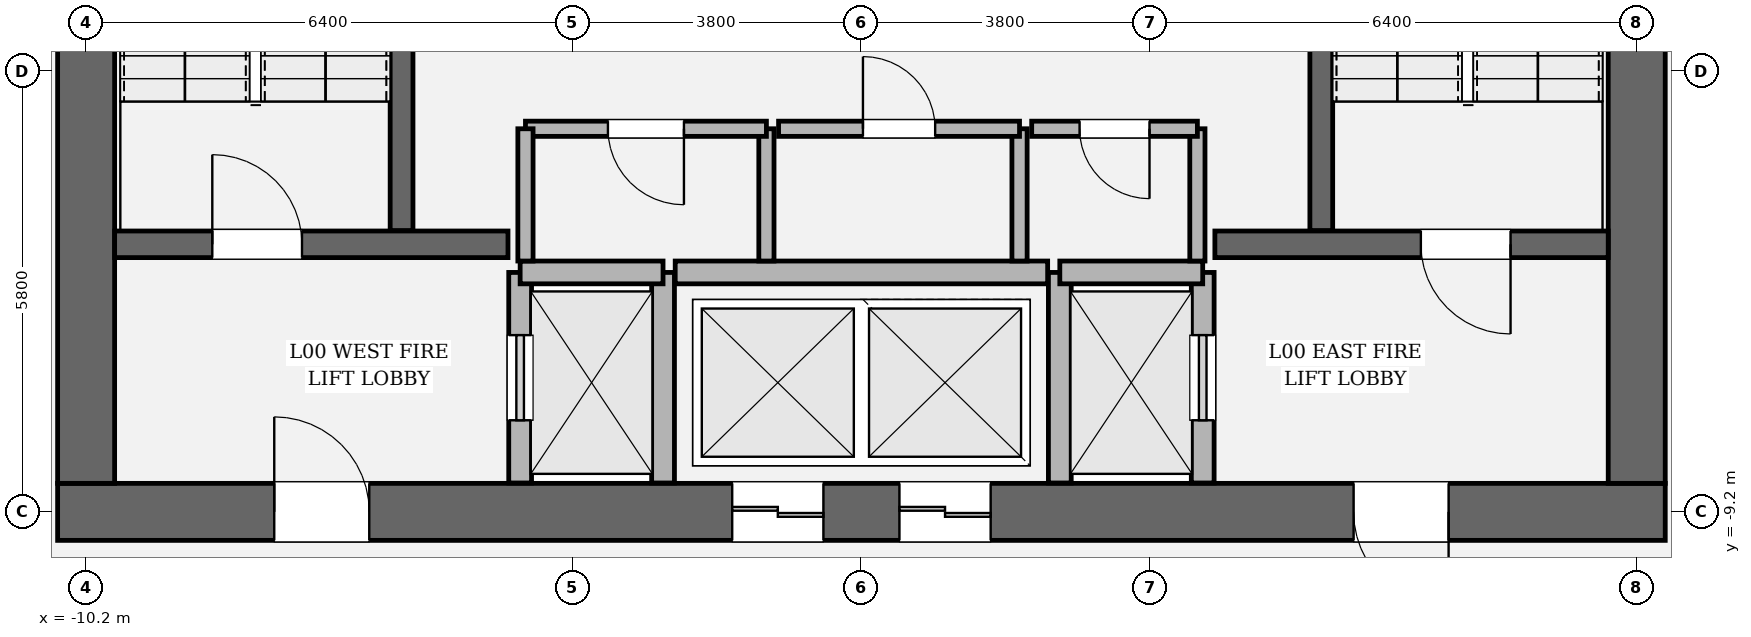
"""IFC4 building model, lengths in metres.
Left out: names, types, materials, properties, quantities, classifications, styles, units other than length and angle.
Written with IfcOpenShell. Run it as: python <this file> out.ifc"""

import sys

from ifc_helpers import new_model, si_unit, direction, frame, frame_2d, origin, place, context, subcontext, project, spatial, rectangle, extrude, element, fill, save


model = new_model("IFC4")
c1 = context("Model", 3, precision=1e-05, world=origin(), true_north=direction((0.0, 1.0)))
c2 = subcontext(c1, "Body", "Model", "MODEL_VIEW")
j1 = project(units=[si_unit("LENGTHUNIT", "METRE"), si_unit("PLANEANGLEUNIT", "RADIAN")], contexts=[c1])
p1 = place(None, origin())
s1 = spatial("IfcSite", under=j1, at=p1, CompositionType="ELEMENT")
p2 = place(p1, origin())
s2 = spatial("IfcBuilding", under=s1, at=p2, CompositionType="ELEMENT")
p3 = place(p2, origin())
s3 = spatial("IfcBuildingStorey", under=s2, at=p3, CompositionType="ELEMENT", Elevation=0.0)
p4 = place(p3, frame((10.575, -9.2, 0.0), z_axis=(0.0, 0.0, 1.0), x_axis=(-1.0, 0.0, 0.0)))
e1 = element("IfcWall", 1, at=p4, inside=s3, PredefinedType="SHEAR", context=c2, shape_type="SweptSolid", body=[
    extrude(rectangle(XDim=21.15, YDim=0.75, at=frame_2d((10.575, 0.0))), origin(), (0.0, 0.0, 1.0), 6.0),
])
p5 = place(p4, frame((2.85, 0.0, 0.0)))
e2 = element("IfcOpeningElement", 2, at=p5, cuts=e1, PredefinedType="OPENING", context=c2, shape_type="SweptSolid", body=[
    extrude(rectangle(XDim=1.25, YDim=2.25, at=frame_2d((0.625, 1.125))), frame((0.0, 0.385, 0.0), z_axis=(0.0, -1.0, 0.0), x_axis=(1.0, 0.0, 0.0)), (0.0, 0.0, 1.0), 0.77),
])
p6 = place(p4, frame((17.05, 0.0, 0.0)))
e3 = element("IfcOpeningElement", 3, at=p6, cuts=e1, PredefinedType="OPENING", context=c2, shape_type="SweptSolid", body=[
    extrude(rectangle(XDim=1.25, YDim=2.25, at=frame_2d((0.625, 1.125))), frame((0.0, 0.385, 0.0), z_axis=(0.0, -1.0, 0.0), x_axis=(1.0, 0.0, 0.0)), (0.0, 0.0, 1.0), 0.77),
])
p7 = place(p4, frame((11.075, 0.0, 0.0)))
e4 = element("IfcOpeningElement", 4, at=p7, cuts=e1, PredefinedType="OPENING", context=c2, shape_type="SweptSolid", body=[
    extrude(rectangle(XDim=1.2, YDim=2.3, at=frame_2d((0.6, 1.15))), frame((0.0, 0.385, 0.0), z_axis=(0.0, -1.0, 0.0), x_axis=(1.0, 0.0, 0.0)), (0.0, 0.0, 1.0), 0.77),
])
p8 = place(p4, frame((8.875, 0.0, 0.0)))
e5 = element("IfcOpeningElement", 5, at=p8, cuts=e1, PredefinedType="OPENING", context=c2, shape_type="SweptSolid", body=[
    extrude(rectangle(XDim=1.2, YDim=2.3, at=frame_2d((0.6, 1.15))), frame((0.0, 0.385, 0.0), z_axis=(0.0, -1.0, 0.0), x_axis=(1.0, 0.0, 0.0)), (0.0, 0.0, 1.0), 0.77),
])
p9 = place(p3, frame((-10.2, -8.825, 0.0), z_axis=(0.0, 0.0, 1.0), x_axis=(0.0, 1.0, 0.0)))
e6 = element("IfcWall", 6, at=p9, inside=s3, PredefinedType="SHEAR", context=c2, shape_type="SweptSolid", body=[
    extrude(rectangle(XDim=17.65, YDim=0.75, at=frame_2d((8.825, 0.0))), origin(), (0.0, 0.0, 1.0), 6.0),
])
p10 = place(p9, frame((12.615, 0.0, 0.0)))
e7 = element("IfcOpeningElement", 7, at=p10, cuts=e6, PredefinedType="OPENING", context=c2, shape_type="SweptSolid", body=[
    extrude(rectangle(XDim=1.18, YDim=2.2, at=frame_2d((0.59, 1.1))), frame((0.0, 0.385, 0.0), z_axis=(0.0, -1.0, 0.0), x_axis=(1.0, 0.0, 0.0)), (0.0, 0.0, 1.0), 0.77),
])
p11 = place(p9, frame((14.865, 0.0, 0.0)))
e8 = element("IfcOpeningElement", 8, at=p11, cuts=e6, PredefinedType="OPENING", context=c2, shape_type="SweptSolid", body=[
    extrude(rectangle(XDim=1.12, YDim=2.25, at=frame_2d((0.56, 1.125))), frame((0.0, 0.385, 0.0), z_axis=(0.0, -1.0, 0.0), x_axis=(1.0, 0.0, 0.0)), (0.0, 0.0, 1.0), 0.77),
])
p12 = place(p9, frame((16.245, 0.0, 0.0)))
e9 = element("IfcOpeningElement", 9, at=p12, cuts=e6, PredefinedType="OPENING", context=c2, shape_type="SweptSolid", body=[
    extrude(rectangle(XDim=1.12, YDim=2.25, at=frame_2d((0.56, 1.125))), frame((0.0, 0.385, 0.0), z_axis=(0.0, -1.0, 0.0), x_axis=(1.0, 0.0, 0.0)), (0.0, 0.0, 1.0), 0.77),
])
p13 = place(p3, frame((10.2, 8.825, 0.0), z_axis=(0.0, 0.0, 1.0), x_axis=(0.0, -1.0, 0.0)))
e10 = element("IfcWall", 10, at=p13, inside=s3, PredefinedType="SHEAR", context=c2, shape_type="SweptSolid", body=[
    extrude(rectangle(XDim=17.65, YDim=0.75, at=frame_2d((8.825, 0.0))), origin(), (0.0, 0.0, 1.0), 6.0),
])
p14 = place(p13, frame((3.855, 0.0, 0.0)))
e11 = element("IfcOpeningElement", 11, at=p14, cuts=e10, PredefinedType="OPENING", context=c2, shape_type="SweptSolid", body=[
    extrude(rectangle(XDim=1.18, YDim=2.2, at=frame_2d((0.59, 1.1))), frame((0.0, 0.385, 0.0), z_axis=(0.0, -1.0, 0.0), x_axis=(1.0, 0.0, 0.0)), (0.0, 0.0, 1.0), 0.77),
])
p15 = place(p13, frame((1.665, 0.0, 0.0)))
e12 = element("IfcOpeningElement", 12, at=p15, cuts=e10, PredefinedType="OPENING", context=c2, shape_type="SweptSolid", body=[
    extrude(rectangle(XDim=1.12, YDim=2.25, at=frame_2d((0.56, 1.125))), frame((0.0, 0.385, 0.0), z_axis=(0.0, -1.0, 0.0), x_axis=(1.0, 0.0, 0.0)), (0.0, 0.0, 1.0), 0.77),
])
p16 = place(p13, frame((0.285, 0.0, 0.0)))
e13 = element("IfcOpeningElement", 13, at=p16, cuts=e10, PredefinedType="OPENING", context=c2, shape_type="SweptSolid", body=[
    extrude(rectangle(XDim=1.12, YDim=2.25, at=frame_2d((0.56, 1.125))), frame((0.0, 0.385, 0.0), z_axis=(0.0, -1.0, 0.0), x_axis=(1.0, 0.0, 0.0)), (0.0, 0.0, 1.0), 0.77),
])
for number, where, z_axis, x_axis in (
    (14, (-6.05, -5.5, 0.0), (0.0, 0.0, 1.0), (0.0, 1.0, 0.0)),
    (15, (6.05, 3.45, 0.0), (0.0, 0.0, 1.0), (0.0, -1.0, 0.0)),
):
    element("IfcWall", number, at=place(p3, frame(where, z_axis=z_axis, x_axis=x_axis)), inside=s3, PredefinedType="SOLIDWALL", context=c2, shape_type="SweptSolid", body=[
        extrude(rectangle(XDim=8.95, YDim=0.3, at=frame_2d((4.475, 0.0))), origin(), (0.0, 0.0, 1.0), 6.0),
    ])
p17 = place(p3, frame((-9.825, -5.68, 0.0), z_axis=(0.0, 0.0, 1.0), x_axis=(1.0, 0.0, 0.0)))
e16 = element("IfcWall", 16, at=p17, inside=s3, PredefinedType="SOLIDWALL", context=c2, shape_type="SweptSolid", body=[
    extrude(rectangle(XDim=5.175, YDim=0.35, at=frame_2d((2.587, 0.0))), origin(), (0.0, 0.0, 1.0), 6.0),
])
p18 = place(p17, frame((1.285, 0.0, 0.0)))
e17 = element("IfcOpeningElement", 17, at=p18, cuts=e16, PredefinedType="OPENING", context=c2, shape_type="SweptSolid", body=[
    extrude(rectangle(XDim=1.18, YDim=2.2, at=frame_2d((0.59, 1.1))), frame((0.0, 0.185, 0.0), z_axis=(0.0, -1.0, 0.0), x_axis=(1.0, 0.0, 0.0)), (0.0, 0.0, 1.0), 0.37),
])
p19 = place(p3, frame((4.65, -5.68, 0.0), z_axis=(0.0, 0.0, 1.0), x_axis=(1.0, 0.0, 0.0)))
e18 = element("IfcWall", 18, at=p19, inside=s3, PredefinedType="SOLIDWALL", context=c2, shape_type="SweptSolid", body=[
    extrude(rectangle(XDim=5.175, YDim=0.35, at=frame_2d((2.587, 0.0))), origin(), (0.0, 0.0, 1.0), 6.0),
])
p20 = place(p19, frame((2.71, 0.0, 0.0)))
e19 = element("IfcOpeningElement", 19, at=p20, cuts=e18, PredefinedType="OPENING", context=c2, shape_type="SweptSolid", body=[
    extrude(rectangle(XDim=1.18, YDim=2.2, at=frame_2d((0.59, 1.1))), frame((0.0, 0.185, 0.0), z_axis=(0.0, -1.0, 0.0), x_axis=(1.0, 0.0, 0.0)), (0.0, 0.0, 1.0), 0.37),
])
p21 = place(p3, frame((-4.49, -8.82, 0.0), z_axis=(0.0, 0.0, 1.0), x_axis=(0.0, 1.0, 0.0)))
e20 = element("IfcWall", 20, at=p21, inside=s3, PredefinedType="SOLIDWALL", context=c2, shape_type="SweptSolid", body=[
    extrude(rectangle(XDim=2.77, YDim=0.3, at=frame_2d((1.385, 0.0))), origin(), (0.0, 0.0, 1.0), 5.72),
])
p22 = place(p21, frame((0.825, 0.0, 0.0)))
e21 = element("IfcOpeningElement", 21, at=p22, cuts=e20, PredefinedType="OPENING", context=c2, shape_type="SweptSolid", body=[
    extrude(rectangle(XDim=1.12, YDim=2.25, at=frame_2d((0.56, 1.125))), frame((0.0, 0.16, 0.0), z_axis=(0.0, -1.0, 0.0), x_axis=(1.0, 0.0, 0.0)), (0.0, 0.0, 1.0), 0.32),
])
p23 = place(p3, frame((-2.61, -8.82, 0.0), z_axis=(0.0, 0.0, 1.0), x_axis=(0.0, 1.0, 0.0)))
e22 = element("IfcWall", 22, at=p23, inside=s3, PredefinedType="SOLIDWALL", context=c2, shape_type="SweptSolid", body=[
    extrude(rectangle(XDim=2.77, YDim=0.3, at=frame_2d((1.385, 0.0))), origin(), (0.0, 0.0, 1.0), 5.72),
])
p24 = place(p3, frame((-4.49, -6.05, 0.0), z_axis=(0.0, 0.0, 1.0), x_axis=(1.0, 0.0, 0.0)))
e23 = element("IfcWall", 23, at=p24, inside=s3, PredefinedType="SOLIDWALL", context=c2, shape_type="SweptSolid", body=[
    extrude(rectangle(XDim=1.88, YDim=0.3, at=frame_2d((0.94, 0.0))), origin(), (0.0, 0.0, 1.0), 5.72),
])
p25 = place(p3, frame((4.49, -8.82, 0.0), z_axis=(0.0, 0.0, 1.0), x_axis=(0.0, 1.0, 0.0)))
e24 = element("IfcWall", 24, at=p25, inside=s3, PredefinedType="SOLIDWALL", context=c2, shape_type="SweptSolid", body=[
    extrude(rectangle(XDim=2.77, YDim=0.3, at=frame_2d((1.385, 0.0))), origin(), (0.0, 0.0, 1.0), 5.72),
])
p26 = place(p25, frame((0.825, 0.0, 0.0)))
e25 = element("IfcOpeningElement", 25, at=p26, cuts=e24, PredefinedType="OPENING", context=c2, shape_type="SweptSolid", body=[
    extrude(rectangle(XDim=1.12, YDim=2.25, at=frame_2d((0.56, 1.125))), frame((0.0, 0.16, 0.0), z_axis=(0.0, -1.0, 0.0), x_axis=(1.0, 0.0, 0.0)), (0.0, 0.0, 1.0), 0.32),
])
p27 = place(p3, frame((2.61, -8.82, 0.0), z_axis=(0.0, 0.0, 1.0), x_axis=(0.0, 1.0, 0.0)))
e26 = element("IfcWall", 26, at=p27, inside=s3, PredefinedType="SOLIDWALL", context=c2, shape_type="SweptSolid", body=[
    extrude(rectangle(XDim=2.77, YDim=0.3, at=frame_2d((1.385, 0.0))), origin(), (0.0, 0.0, 1.0), 5.72),
])
p28 = place(p3, frame((2.61, -6.05, 0.0), z_axis=(0.0, 0.0, 1.0), x_axis=(1.0, 0.0, 0.0)))
e27 = element("IfcWall", 27, at=p28, inside=s3, PredefinedType="SOLIDWALL", context=c2, shape_type="SweptSolid", body=[
    extrude(rectangle(XDim=1.88, YDim=0.3, at=frame_2d((0.94, 0.0))), origin(), (0.0, 0.0, 1.0), 5.72),
])
p29 = place(p3, frame((-2.45, -6.05, 0.0), z_axis=(0.0, 0.0, 1.0), x_axis=(1.0, 0.0, 0.0)))
e28 = element("IfcWall", 28, at=p29, inside=s3, PredefinedType="SOLIDWALL", context=c2, shape_type="SweptSolid", body=[
    extrude(rectangle(XDim=4.9, YDim=0.3, at=frame_2d((2.45, 0.0))), origin(), (0.0, 0.0, 1.0), 5.72),
])
p30 = place(p3, frame((-1.25, -5.9, 0.0), z_axis=(0.0, 0.0, 1.0), x_axis=(0.0, 1.0, 0.0)))
e29 = element("IfcWall", 29, at=p30, inside=s3, PredefinedType="SOLIDWALL", context=c2, shape_type="SweptSolid", body=[
    extrude(rectangle(XDim=1.74, YDim=0.2, at=frame_2d((0.87, 0.0))), origin(), (0.0, 0.0, 1.0), 5.72),
])
p31 = place(p3, frame((-1.25, -4.16, 0.0), z_axis=(0.0, 0.0, 1.0), x_axis=(-1.0, 0.0, 0.0)))
e30 = element("IfcWall", 30, at=p31, inside=s3, PredefinedType="SOLIDWALL", context=c2, shape_type="SweptSolid", body=[
    extrude(rectangle(XDim=3.17, YDim=0.2, at=frame_2d((1.585, 0.0))), origin(), (0.0, 0.0, 1.0), 5.72),
])
p32 = place(p31, frame((1.085, 0.0, 0.0)))
e31 = element("IfcOpeningElement", 31, at=p32, cuts=e30, PredefinedType="OPENING", context=c2, shape_type="SweptSolid", body=[
    extrude(rectangle(XDim=1.0, YDim=2.15, at=frame_2d((0.5, 1.075))), frame((0.0, 0.11, 0.0), z_axis=(0.0, -1.0, 0.0), x_axis=(1.0, 0.0, 0.0)), (0.0, 0.0, 1.0), 0.22),
])
for number, where, z_axis, x_axis in (
    (32, (-4.42, -4.16, 0.0), (0.0, 0.0, 1.0), (0.0, -1.0, 0.0)),
    (33, (2.08, -5.9, 0.0), (0.0, 0.0, 1.0), (0.0, 1.0, 0.0)),
):
    element("IfcWall", number, at=place(p3, frame(where, z_axis=z_axis, x_axis=x_axis)), inside=s3, PredefinedType="SOLIDWALL", context=c2, shape_type="SweptSolid", body=[
        extrude(rectangle(XDim=1.74, YDim=0.2, at=frame_2d((0.87, 0.0))), origin(), (0.0, 0.0, 1.0), 5.72),
    ])
p33 = place(p3, frame((2.08, -4.16, 0.0), z_axis=(0.0, 0.0, 1.0), x_axis=(-1.0, 0.0, 0.0)))
e34 = element("IfcWall", 34, at=p33, inside=s3, PredefinedType="SOLIDWALL", context=c2, shape_type="SweptSolid", body=[
    extrude(rectangle(XDim=3.17, YDim=0.2, at=frame_2d((1.585, 0.0))), origin(), (0.0, 0.0, 1.0), 5.72),
])
p34 = place(p33, frame((1.11, 0.0, 0.0)))
e35 = element("IfcOpeningElement", 35, at=p34, cuts=e34, PredefinedType="OPENING", context=c2, shape_type="SweptSolid", body=[
    extrude(rectangle(XDim=0.95, YDim=2.15, at=frame_2d((0.475, 1.075))), frame((0.0, 0.11, 0.0), z_axis=(0.0, -1.0, 0.0), x_axis=(1.0, 0.0, 0.0)), (0.0, 0.0, 1.0), 0.22),
])
p35 = place(p3, frame((4.42, -5.9, 0.0), z_axis=(0.0, 0.0, 1.0), x_axis=(0.0, 1.0, 0.0)))
e36 = element("IfcWall", 36, at=p35, inside=s3, PredefinedType="SOLIDWALL", context=c2, shape_type="SweptSolid", body=[
    extrude(rectangle(XDim=1.74, YDim=0.2, at=frame_2d((0.87, 0.0))), origin(), (0.0, 0.0, 1.0), 5.72),
])
p36 = place(p3, frame((4.42, -4.16, 0.0), z_axis=(0.0, 0.0, 1.0), x_axis=(-1.0, 0.0, 0.0)))
e37 = element("IfcWall", 37, at=p36, inside=s3, PredefinedType="SOLIDWALL", context=c2, shape_type="SweptSolid", body=[
    extrude(rectangle(XDim=2.18, YDim=0.2, at=frame_2d((1.09, 0.0))), origin(), (0.0, 0.0, 1.0), 5.72),
])
p37 = place(p36, frame((0.63, 0.0, 0.0)))
e38 = element("IfcOpeningElement", 38, at=p37, cuts=e37, PredefinedType="OPENING", context=c2, shape_type="SweptSolid", body=[
    extrude(rectangle(XDim=0.92, YDim=2.1, at=frame_2d((0.46, 1.05))), frame((0.0, 0.11, 0.0), z_axis=(0.0, -1.0, 0.0), x_axis=(1.0, 0.0, 0.0)), (0.0, 0.0, 1.0), 0.22),
])
p38 = place(p18, origin())
e39 = element("IfcDoor", 39, at=p38, inside=s3, OperationType="SINGLE_SWING_LEFT", PredefinedType="DOOR", context=c2, shape_type="SweptSolid", body=[
    extrude(rectangle(XDim=1.18, YDim=2.2, at=frame_2d((0.59, 1.1))), frame((0.0, 0.025, 0.0), z_axis=(0.0, -1.0, 0.0), x_axis=(1.0, 0.0, 0.0)), (0.0, 0.0, 1.0), 0.05),
])
fill(e17, e39)
p39 = place(p20, origin())
e40 = element("IfcDoor", 40, at=p39, inside=s3, OperationType="SINGLE_SWING_RIGHT", PredefinedType="DOOR", context=c2, shape_type="SweptSolid", body=[
    extrude(rectangle(XDim=1.18, YDim=2.2, at=frame_2d((0.59, 1.1))), frame((0.0, 0.025, 0.0), z_axis=(0.0, -1.0, 0.0), x_axis=(1.0, 0.0, 0.0)), (0.0, 0.0, 1.0), 0.05),
])
fill(e19, e40)
p40 = place(p5, origin())
e41 = element("IfcDoor", 41, at=p40, inside=s3, OperationType="SINGLE_SWING_LEFT", PredefinedType="DOOR", context=c2, shape_type="SweptSolid", body=[
    extrude(rectangle(XDim=1.25, YDim=2.25, at=frame_2d((0.625, 1.125))), frame((0.0, 0.025, 0.0), z_axis=(0.0, -1.0, 0.0), x_axis=(1.0, 0.0, 0.0)), (0.0, 0.0, 1.0), 0.05),
])
fill(e2, e41)
p41 = place(p6, origin())
e42 = element("IfcDoor", 42, at=p41, inside=s3, OperationType="SINGLE_SWING_RIGHT", PredefinedType="DOOR", context=c2, shape_type="SweptSolid", body=[
    extrude(rectangle(XDim=1.25, YDim=2.25, at=frame_2d((0.625, 1.125))), frame((0.0, 0.025, 0.0), z_axis=(0.0, -1.0, 0.0), x_axis=(1.0, 0.0, 0.0)), (0.0, 0.0, 1.0), 0.05),
])
fill(e3, e42)
p42 = place(p22, origin())
e43 = element("IfcDoor", 43, at=p42, inside=s3, OperationType="SLIDING_TO_LEFT", PredefinedType="DOOR", context=c2, shape_type="SweptSolid", body=[
    extrude(rectangle(XDim=1.12, YDim=2.25, at=frame_2d((0.56, 1.125))), frame((0.0, 0.025, 0.0), z_axis=(0.0, -1.0, 0.0), x_axis=(1.0, 0.0, 0.0)), (0.0, 0.0, 1.0), 0.05),
])
fill(e21, e43)
p43 = place(p26, origin())
e44 = element("IfcDoor", 44, at=p43, inside=s3, OperationType="SLIDING_TO_RIGHT", PredefinedType="DOOR", context=c2, shape_type="SweptSolid", body=[
    extrude(rectangle(XDim=1.12, YDim=2.25, at=frame_2d((0.56, 1.125))), frame((0.0, 0.025, 0.0), z_axis=(0.0, -1.0, 0.0), x_axis=(1.0, 0.0, 0.0)), (0.0, 0.0, 1.0), 0.05),
])
fill(e25, e44)
p44 = place(p7, origin())
e45 = element("IfcDoor", 45, at=p44, inside=s3, OperationType="DOUBLE_DOOR_SLIDING", PredefinedType="DOOR", context=c2, shape_type="SweptSolid", body=[
    extrude(rectangle(XDim=1.2, YDim=2.3, at=frame_2d((0.6, 1.15))), frame((0.0, 0.025, 0.0), z_axis=(0.0, -1.0, 0.0), x_axis=(1.0, 0.0, 0.0)), (0.0, 0.0, 1.0), 0.05),
])
fill(e4, e45)
p45 = place(p8, origin())
e46 = element("IfcDoor", 46, at=p45, inside=s3, OperationType="DOUBLE_DOOR_SLIDING", PredefinedType="DOOR", context=c2, shape_type="SweptSolid", body=[
    extrude(rectangle(XDim=1.2, YDim=2.3, at=frame_2d((0.6, 1.15))), frame((0.0, 0.025, 0.0), z_axis=(0.0, -1.0, 0.0), x_axis=(1.0, 0.0, 0.0)), (0.0, 0.0, 1.0), 0.05),
])
fill(e5, e46)
p46 = place(p32, origin())
e47 = element("IfcDoor", 47, at=p46, inside=s3, OperationType="SINGLE_SWING_LEFT", PredefinedType="DOOR", context=c2, shape_type="SweptSolid", body=[
    extrude(rectangle(XDim=1.0, YDim=2.15, at=frame_2d((0.5, 1.075))), frame((0.0, 0.025, 0.0), z_axis=(0.0, -1.0, 0.0), x_axis=(1.0, 0.0, 0.0)), (0.0, 0.0, 1.0), 0.05),
])
fill(e31, e47)
p47 = place(p34, origin())
e48 = element("IfcDoor", 48, at=p47, inside=s3, OperationType="SINGLE_SWING_RIGHT", PredefinedType="DOOR", context=c2, shape_type="SweptSolid", body=[
    extrude(rectangle(XDim=0.95, YDim=2.15, at=frame_2d((0.475, 1.075))), frame((0.0, 0.025, 0.0), z_axis=(0.0, -1.0, 0.0), x_axis=(1.0, 0.0, 0.0)), (0.0, 0.0, 1.0), 0.05),
])
fill(e35, e48)
p48 = place(p37, origin())
e49 = element("IfcDoor", 49, at=p48, inside=s3, OperationType="SINGLE_SWING_LEFT", PredefinedType="DOOR", context=c2, shape_type="SweptSolid", body=[
    extrude(rectangle(XDim=0.92, YDim=2.1, at=frame_2d((0.46, 1.05))), frame((0.0, 0.025, 0.0), z_axis=(0.0, -1.0, 0.0), x_axis=(1.0, 0.0, 0.0)), (0.0, 0.0, 1.0), 0.05),
])
fill(e38, e49)
save(model, sys.argv[1])
